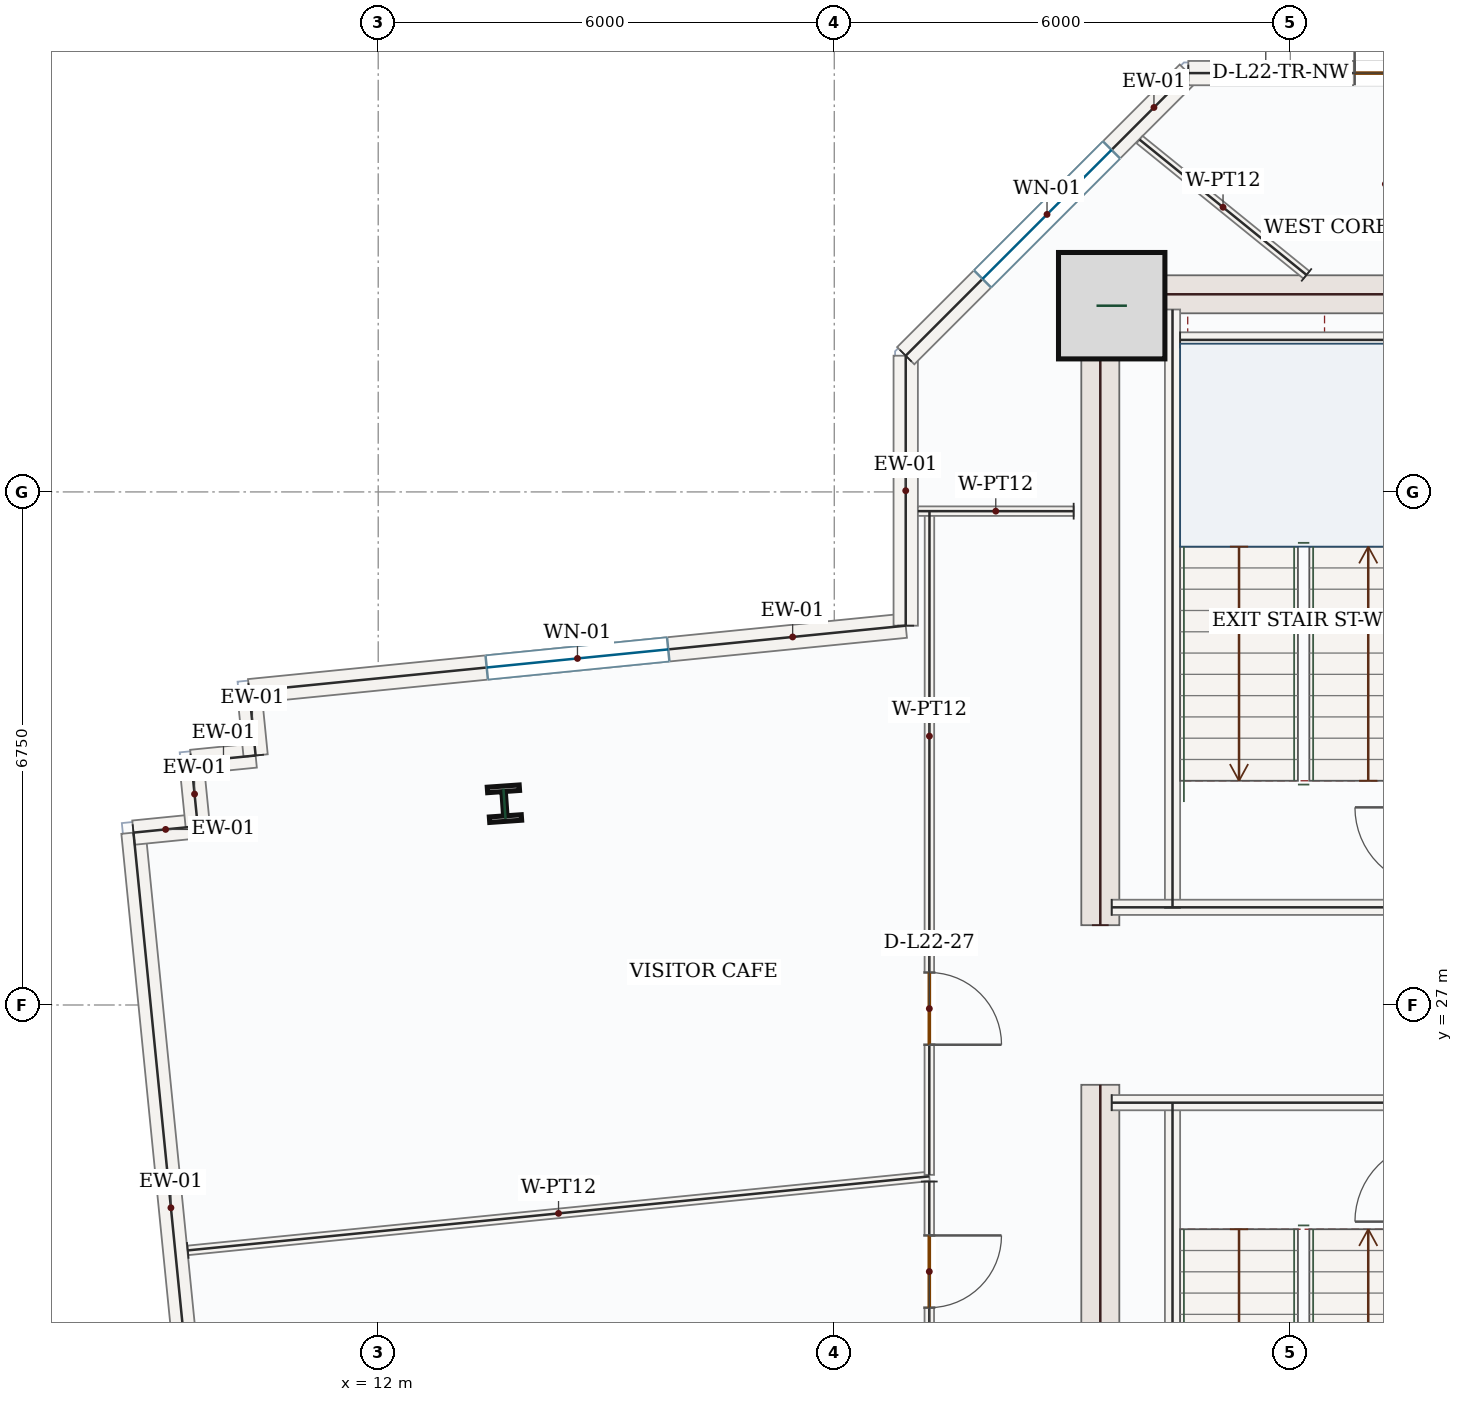
"""IFC4 building model, lengths in metres.
Left out: names, types, materials, properties, quantities, classifications, styles, units other than length and angle.
Written with IfcOpenShell. Run it as: python <this file> out.ifc"""

import sys

from ifc_helpers import new_model, si_unit, direction, frame, frame_2d, origin, origin_2d, place, context, subcontext, project, spatial, rectangle, i_section, extrude, source, transform, mapped, element, fill, save


model = new_model("IFC4")
c1 = context("Model", 3, precision=1e-05, world=origin(), true_north=direction((0.0, 1.0)))
c2 = subcontext(c1, "Body", "Model", "MODEL_VIEW")
j1 = project(units=[si_unit("LENGTHUNIT", "METRE"), si_unit("PLANEANGLEUNIT", "RADIAN")], contexts=[c1])
p1 = place(None, origin())
s1 = spatial("IfcSite", under=j1, at=p1, CompositionType="ELEMENT")
p2 = place(p1, origin())
s2 = spatial("IfcBuilding", under=s1, at=p2, CompositionType="ELEMENT")
p3 = place(p2, frame((0.0, 0.0, 100.5)))
s3 = spatial("IfcBuildingStorey", under=s2, at=p3, CompositionType="ELEMENT", Elevation=100.5)
m1 = source(origin(), c2, "Body", "SweptSolid", [
    extrude(rectangle(XDim=8.55, YDim=0.5, at=frame_2d((4.275, 0.0))), origin(), (0.0, 0.0, 1.0), 3.95),
])
for number, where, z_axis, x_axis in (
    (1, (21.5, 17.4, 0.0), (0.0, 0.0, 1.0), (0.0, 1.0, 0.0)),
    (2, (21.5, 28.05, 0.0), (0.0, 0.0, 1.0), (0.0, 1.0, 0.0)),
):
    element("IfcWall", number, at=place(p3, frame(where, z_axis=z_axis, x_axis=x_axis)), inside=s3, PredefinedType="SHEAR", context=c2, shape_type="MappedRepresentation", body=[
        mapped(m1, transform((0.0, 0.0, 0.0), x_axis=(1.0, 0.0, 0.0), y_axis=(0.0, 1.0, 0.0), z_axis=(0.0, 0.0, 1.0), scale=1.0)),
    ])
m2 = source(origin(), c2, "Body", "SweptSolid", [
    extrude(rectangle(XDim=7.0, YDim=0.5, at=frame_2d((3.5, 0.0))), origin(), (0.0, 0.0, 1.0), 3.95),
])
p4 = place(p3, frame((21.75, 36.35, 0.0), z_axis=(0.0, 0.0, 1.0), x_axis=(1.0, 0.0, 0.0)))
e3 = element("IfcWall", 3, at=p4, inside=s3, PredefinedType="SHEAR", context=c2, shape_type="MappedRepresentation", body=[
    mapped(m2, transform((0.0, 0.0, 0.0), x_axis=(1.0, 0.0, 0.0), y_axis=(0.0, 1.0, 0.0), z_axis=(0.0, 0.0, 1.0), scale=1.0)),
])
m3 = source(origin(), c2, "Body", "SweptSolid", [
    extrude(rectangle(XDim=1.4, YDim=1.4, at=origin_2d()), origin(), (0.0, 0.0, 1.0), 4.2),
])
p5 = place(p3, frame((21.65, 36.2, 0.0), z_axis=(0.0, 0.0, 1.0), x_axis=(1.0, 0.0, 0.0)))
e4 = element("IfcColumn", 4, at=p5, inside=s3, PredefinedType="COLUMN", context=c2, shape_type="MappedRepresentation", body=[
    mapped(m3, transform((0.0, 0.0, 0.0), x_axis=(1.0, 0.0, 0.0), y_axis=(0.0, 1.0, 0.0), z_axis=(0.0, 0.0, 1.0), scale=1.0)),
])
m4 = source(origin(), c2, "Body", "SweptSolid", [
    extrude(i_section(OverallWidth=0.421, OverallDepth=0.465, WebThickness=0.045, FlangeThickness=0.073, FilletRadius=0.018, at=origin_2d()), origin(), (0.0, 0.0, 1.0), 4.2),
])
p6 = place(p3, frame((13.661, 29.648, 0.0), z_axis=(0.0, 0.0, 1.0), x_axis=(0.99756405026, 0.069756473744, 0.0)))
e5 = element("IfcColumn", 5, at=p6, inside=s3, PredefinedType="COLUMN", context=c2, shape_type="MappedRepresentation", body=[
    mapped(m4, transform((0.0, 0.0, 0.0), x_axis=(1.0, 0.0, 0.0), y_axis=(0.0, 1.0, 0.0), z_axis=(0.0, 0.0, 1.0), scale=1.0)),
])
m5 = source(origin(), c2, "Body", "SweptSolid", [
    extrude(rectangle(XDim=9.92, YDim=0.32, at=frame_2d((4.96, 0.0))), origin(), (0.0, 0.0, 1.0), 3.95),
])
p7 = place(p3, frame((9.765, 19.397, 0.0), z_axis=(0.0, 0.0, 1.0), x_axis=(-0.099303907908, 0.995057151059, 0.0)))
e6 = element("IfcWall", 6, at=p7, inside=s3, PredefinedType="SOLIDWALL", context=c2, shape_type="MappedRepresentation", body=[
    mapped(m5, transform((0.0, 0.0, 0.0), x_axis=(1.0, 0.0, 0.0), y_axis=(0.0, 1.0, 0.0), z_axis=(0.0, 0.0, 1.0), scale=1.0)),
])
m6 = source(origin(), c2, "Body", "SweptSolid", [
    extrude(rectangle(XDim=0.85, YDim=0.32, at=frame_2d((0.425, 0.0))), origin(), (0.0, 0.0, 1.0), 3.95),
])
for number, where, z_axis, x_axis in (
    (7, (8.78, 29.268, 0.0), (0.0, 0.0, 1.0), (0.995, 0.099, 0.0)),
    (8, (9.626, 29.352, 0.0), (0.0, 0.0, 1.0), (-0.099, 0.995, 0.0)),
    (9, (9.542, 30.198, 0.0), (0.0, 0.0, 1.0), (0.995, 0.099, 0.0)),
    (10, (10.387, 30.282, 0.0), (0.0, 0.0, 1.0), (-0.099, 0.995, 0.0)),
):
    element("IfcWall", number, at=place(p3, frame(where, z_axis=z_axis, x_axis=x_axis)), inside=s3, PredefinedType="SOLIDWALL", context=c2, shape_type="MappedRepresentation", body=[
        mapped(m6, transform((0.0, 0.0, 0.0), x_axis=(1.0, 0.0, 0.0), y_axis=(0.0, 1.0, 0.0), z_axis=(0.0, 0.0, 1.0), scale=1.0)),
    ])
p8 = place(p3, frame((10.303, 31.128, 0.0), z_axis=(0.0, 0.0, 1.0), x_axis=(0.995055831351, 0.099317130918, 0.0)))
e11 = element("IfcWall", 11, at=p8, inside=s3, PredefinedType="SOLIDWALL", context=c2, shape_type="SweptSolid", body=[
    extrude(rectangle(XDim=8.68, YDim=0.32, at=frame_2d((4.34, 0.0))), origin(), (0.0, 0.0, 1.0), 3.95),
])
p9 = place(p8, frame((3.14, 0.0, 0.85)))
e12 = element("IfcOpeningElement", 12, at=p9, cuts=e11, PredefinedType="OPENING", context=c2, shape_type="SweptSolid", body=[
    extrude(rectangle(XDim=2.4, YDim=1.8, at=frame_2d((1.2, 0.9))), frame((0.0, 0.17, 0.0), z_axis=(0.0, -1.0, 0.0), x_axis=(1.0, 0.0, 0.0)), (0.0, 0.0, 1.0), 0.34),
])
m7 = source(origin(), c2, "Body", "SweptSolid", [
    extrude(rectangle(XDim=3.552, YDim=0.32, at=frame_2d((1.776, 0.0))), origin(), (0.0, 0.0, 1.0), 3.95),
])
p10 = place(p3, frame((18.94, 31.99, 0.0), z_axis=(0.0, 0.0, 1.0), x_axis=(0.0, 1.0, 0.0)))
e13 = element("IfcWall", 13, at=p10, inside=s3, PredefinedType="SOLIDWALL", context=c2, shape_type="MappedRepresentation", body=[
    mapped(m7, transform((0.0, 0.0, 0.0), x_axis=(1.0, 0.0, 0.0), y_axis=(0.0, 1.0, 0.0), z_axis=(0.0, 0.0, 1.0), scale=1.0)),
])
p11 = place(p3, frame((18.94, 35.542, 0.0), z_axis=(0.0, 0.0, 1.0), x_axis=(0.707106781187, 0.707106781187, 0.0)))
e14 = element("IfcWall", 14, at=p11, inside=s3, PredefinedType="SOLIDWALL", context=c2, shape_type="SweptSolid", body=[
    extrude(rectangle(XDim=5.258, YDim=0.32, at=frame_2d((2.629, 0.0))), origin(), (0.0, 0.0, 1.0), 3.95),
])
p12 = place(p11, frame((1.429, 0.0, 0.85)))
e15 = element("IfcOpeningElement", 15, at=p12, cuts=e14, PredefinedType="OPENING", context=c2, shape_type="SweptSolid", body=[
    extrude(rectangle(XDim=2.4, YDim=1.8, at=frame_2d((1.2, 0.9))), frame((0.0, 0.17, 0.0), z_axis=(0.0, -1.0, 0.0), x_axis=(1.0, 0.0, 0.0)), (0.0, 0.0, 1.0), 0.34),
])
p13 = place(p3, frame((22.658, 39.26, 0.0), z_axis=(0.0, 0.0, 1.0), x_axis=(1.0, 0.0, 0.0)))
e16 = element("IfcWall", 16, at=p13, inside=s3, PredefinedType="SOLIDWALL", context=c2, shape_type="SweptSolid", body=[
    extrude(rectangle(XDim=5.425, YDim=0.32, at=frame_2d((2.713, 0.0))), origin(), (0.0, 0.0, 1.0), 3.95),
])
p14 = place(p13, frame((2.188, 0.0, 0.0)))
e17 = element("IfcOpeningElement", 17, at=p14, cuts=e16, PredefinedType="OPENING", context=c2, shape_type="SweptSolid", body=[
    extrude(rectangle(XDim=1.05, YDim=2.15, at=frame_2d((0.525, 1.075))), frame((0.0, 0.17, 0.0), z_axis=(0.0, -1.0, 0.0), x_axis=(1.0, 0.0, 0.0)), (0.0, 0.0, 1.0), 0.34),
])
m8 = source(origin(), c2, "Body", "SweptSolid", [
    extrude(rectangle(XDim=7.87, YDim=0.2, at=frame_2d((3.935, 0.0))), origin(), (0.0, 0.0, 1.0), 3.95),
])
for number, where, z_axis, x_axis in (
    (18, (22.45, 17.85, 0.0), (0.0, 0.0, 1.0), (0.0, 1.0, 0.0)),
    (19, (22.45, 28.28, 0.0), (0.0, 0.0, 1.0), (0.0, 1.0, 0.0)),
):
    element("IfcWall", number, at=place(p3, frame(where, z_axis=z_axis, x_axis=x_axis)), inside=s3, PredefinedType="SOLIDWALL", context=c2, shape_type="MappedRepresentation", body=[
        mapped(m8, transform((0.0, 0.0, 0.0), x_axis=(1.0, 0.0, 0.0), y_axis=(0.0, 1.0, 0.0), z_axis=(0.0, 0.0, 1.0), scale=1.0)),
    ])
m9 = source(origin(), c2, "Body", "SweptSolid", [
    extrude(rectangle(XDim=4.25, YDim=0.2, at=frame_2d((2.125, 0.0))), origin(), (0.0, 0.0, 1.0), 3.95),
])
for number, where, z_axis, x_axis in (
    (20, (21.65, 25.715, 0.0), (0.0, 0.0, 1.0), (1.0, 0.0, 0.0)),
    (21, (21.65, 28.285, 0.0), (0.0, 0.0, 1.0), (1.0, 0.0, 0.0)),
):
    element("IfcWall", number, at=place(p3, frame(where, z_axis=z_axis, x_axis=x_axis)), inside=s3, PredefinedType="SOLIDWALL", context=c2, shape_type="MappedRepresentation", body=[
        mapped(m9, transform((0.0, 0.0, 0.0), x_axis=(1.0, 0.0, 0.0), y_axis=(0.0, 1.0, 0.0), z_axis=(0.0, 0.0, 1.0), scale=1.0)),
    ])
m10 = source(origin(), c2, "Body", "SweptSolid", [
    extrude(rectangle(XDim=3.25, YDim=0.2, at=frame_2d((1.625, 0.0))), origin(), (0.0, 0.0, 1.0), 3.95),
])
p15 = place(p3, frame((22.55, 35.75, 0.0), z_axis=(0.0, 0.0, 1.0), x_axis=(1.0, 0.0, 0.0)))
e22 = element("IfcWall", 22, at=p15, inside=s3, PredefinedType="SOLIDWALL", context=c2, shape_type="MappedRepresentation", body=[
    mapped(m10, transform((0.0, 0.0, 0.0), x_axis=(1.0, 0.0, 0.0), y_axis=(0.0, 1.0, 0.0), z_axis=(0.0, 0.0, 1.0), scale=1.0)),
])
m11 = source(origin(), c2, "Body", "SweptSolid", [
    extrude(rectangle(XDim=2.827, YDim=0.125, at=frame_2d((1.414, 0.0))), origin(), (0.0, 0.0, 1.0), 3.95),
])
p16 = place(p3, frame((24.213, 36.605, 0.0), z_axis=(0.0, 0.0, 1.0), x_axis=(-0.776808269954, 0.62973717671, 0.0)))
e23 = element("IfcWall", 23, at=p16, inside=s3, PredefinedType="PARTITIONING", context=c2, shape_type="MappedRepresentation", body=[
    mapped(m11, transform((0.0, 0.0, 0.0), x_axis=(1.0, 0.0, 0.0), y_axis=(0.0, 1.0, 0.0), z_axis=(0.0, 0.0, 1.0), scale=1.0)),
])
m12 = source(origin(), c2, "Body", "SweptSolid", [
    extrude(rectangle(XDim=9.804, YDim=0.125, at=frame_2d((4.902, 0.0))), origin(), (0.0, 0.0, 1.0), 3.95),
])
p17 = place(p3, frame((9.495, 23.771, 0.0), z_axis=(0.0, 0.0, 1.0), x_axis=(0.995053942122, 0.099336057238, 0.0)))
e24 = element("IfcWall", 24, at=p17, inside=s3, PredefinedType="PARTITIONING", context=c2, shape_type="MappedRepresentation", body=[
    mapped(m12, transform((0.0, 0.0, 0.0), x_axis=(1.0, 0.0, 0.0), y_axis=(0.0, 1.0, 0.0), z_axis=(0.0, 0.0, 1.0), scale=1.0)),
])
p18 = place(p3, frame((19.25, 24.677, 0.0), z_axis=(0.0, 0.0, 1.0), x_axis=(0.000116979586, -0.999999993158, 0.0)))
e25 = element("IfcWall", 25, at=p18, inside=s3, PredefinedType="PARTITIONING", context=c2, shape_type="SweptSolid", body=[
    extrude(rectangle(XDim=4.174, YDim=0.125, at=frame_2d((2.087, 0.0))), origin(), (0.0, 0.0, 1.0), 3.95),
])
p19 = place(p18, frame((0.709, 0.0, 0.0)))
e26 = element("IfcOpeningElement", 26, at=p19, cuts=e25, PredefinedType="OPENING", context=c2, shape_type="SweptSolid", body=[
    extrude(rectangle(XDim=0.95, YDim=2.15, at=frame_2d((0.475, 1.075))), frame((0.0, 0.073, 0.0), z_axis=(0.0, -1.0, 0.0), x_axis=(1.0, 0.0, 0.0)), (0.0, 0.0, 1.0), 0.145),
])
p20 = place(p3, frame((19.253, 33.497, 0.0), z_axis=(0.0, 0.0, 1.0), x_axis=(-0.000307554646, -0.999999952705, 0.0)))
e27 = element("IfcWall", 27, at=p20, inside=s3, PredefinedType="PARTITIONING", context=c2, shape_type="SweptSolid", body=[
    extrude(rectangle(XDim=8.732, YDim=0.125, at=frame_2d((4.366, 0.0))), origin(), (0.0, 0.0, 1.0), 3.95),
])
p21 = place(p20, frame((6.07, 0.0, 0.0)))
e28 = element("IfcOpeningElement", 28, at=p21, cuts=e27, PredefinedType="OPENING", context=c2, shape_type="SweptSolid", body=[
    extrude(rectangle(XDim=0.95, YDim=2.15, at=frame_2d((0.475, 1.075))), frame((0.0, 0.073, 0.0), z_axis=(0.0, -1.0, 0.0), x_axis=(1.0, 0.0, 0.0)), (0.0, 0.0, 1.0), 0.145),
])
m13 = source(origin(), c2, "Body", "SweptSolid", [
    extrude(rectangle(XDim=2.049, YDim=0.125, at=frame_2d((1.025, 0.0))), origin(), (0.0, 0.0, 1.0), 3.95),
])
p22 = place(p3, frame((21.149, 33.497, 0.0), z_axis=(0.0, 0.0, 1.0), x_axis=(-0.999999936133, 0.000357398119, 0.0)))
e29 = element("IfcWall", 29, at=p22, inside=s3, PredefinedType="PARTITIONING", context=c2, shape_type="MappedRepresentation", body=[
    mapped(m13, transform((0.0, 0.0, 0.0), x_axis=(1.0, 0.0, 0.0), y_axis=(0.0, 1.0, 0.0), z_axis=(0.0, 0.0, 1.0), scale=1.0)),
])
m14 = source(origin(), c2, "Body", "SweptSolid", [
    extrude(rectangle(XDim=2.4, YDim=1.8, at=frame_2d((1.2, 0.9))), frame((0.0, 0.03, 0.0), z_axis=(0.0, -1.0, 0.0), x_axis=(1.0, 0.0, 0.0)), (0.0, 0.0, 1.0), 0.06),
])
p23 = place(p9, origin())
e30 = element("IfcWindow", 30, at=p23, inside=s3, PartitioningType="DOUBLE_PANEL_VERTICAL", PredefinedType="WINDOW", context=c2, shape_type="MappedRepresentation", body=[
    mapped(m14, transform((0.0, 0.0, 0.0), x_axis=(1.0, 0.0, 0.0), y_axis=(0.0, 1.0, 0.0), z_axis=(0.0, 0.0, 1.0), scale=1.0)),
])
fill(e12, e30)
p24 = place(p12, origin())
e31 = element("IfcWindow", 31, at=p24, inside=s3, PartitioningType="DOUBLE_PANEL_VERTICAL", PredefinedType="WINDOW", context=c2, shape_type="MappedRepresentation", body=[
    mapped(m14, transform((0.0, 0.0, 0.0), x_axis=(1.0, 0.0, 0.0), y_axis=(0.0, 1.0, 0.0), z_axis=(0.0, 0.0, 1.0), scale=1.0)),
])
fill(e15, e31)
m15 = source(origin(), c2, "Body", "SweptSolid", [
    extrude(rectangle(XDim=1.05, YDim=2.15, at=frame_2d((0.525, 1.075))), frame((0.0, 0.025, 0.0), z_axis=(0.0, -1.0, 0.0), x_axis=(1.0, 0.0, 0.0)), (0.0, 0.0, 1.0), 0.05),
])
p25 = place(p14, origin())
e32 = element("IfcDoor", 32, at=p25, inside=s3, OperationType="SINGLE_SWING_LEFT", PredefinedType="DOOR", context=c2, shape_type="MappedRepresentation", body=[
    mapped(m15, transform((0.0, 0.0, 0.0), x_axis=(1.0, 0.0, 0.0), y_axis=(0.0, 1.0, 0.0), z_axis=(0.0, 0.0, 1.0), scale=1.0)),
])
fill(e17, e32)
m16 = source(origin(), c2, "Body", "SweptSolid", [
    extrude(rectangle(XDim=0.95, YDim=2.15, at=frame_2d((0.475, 1.075))), frame((0.0, 0.025, 0.0), z_axis=(0.0, -1.0, 0.0), x_axis=(1.0, 0.0, 0.0)), (0.0, 0.0, 1.0), 0.05),
])
p26 = place(p21, origin())
e33 = element("IfcDoor", 33, at=p26, inside=s3, OperationType="SINGLE_SWING_RIGHT", PredefinedType="DOOR", context=c2, shape_type="MappedRepresentation", body=[
    mapped(m16, transform((0.0, 0.0, 0.0), x_axis=(1.0, 0.0, 0.0), y_axis=(0.0, 1.0, 0.0), z_axis=(0.0, 0.0, 1.0), scale=1.0)),
])
fill(e28, e33)
p27 = place(p19, origin())
e34 = element("IfcDoor", 34, at=p27, inside=s3, OperationType="SINGLE_SWING_LEFT", PredefinedType="DOOR", context=c2, shape_type="MappedRepresentation", body=[
    mapped(m16, transform((0.0, 0.0, 0.0), x_axis=(1.0, 0.0, 0.0), y_axis=(0.0, 1.0, 0.0), z_axis=(0.0, 0.0, 1.0), scale=1.0)),
])
fill(e26, e34)
save(model, sys.argv[1])
